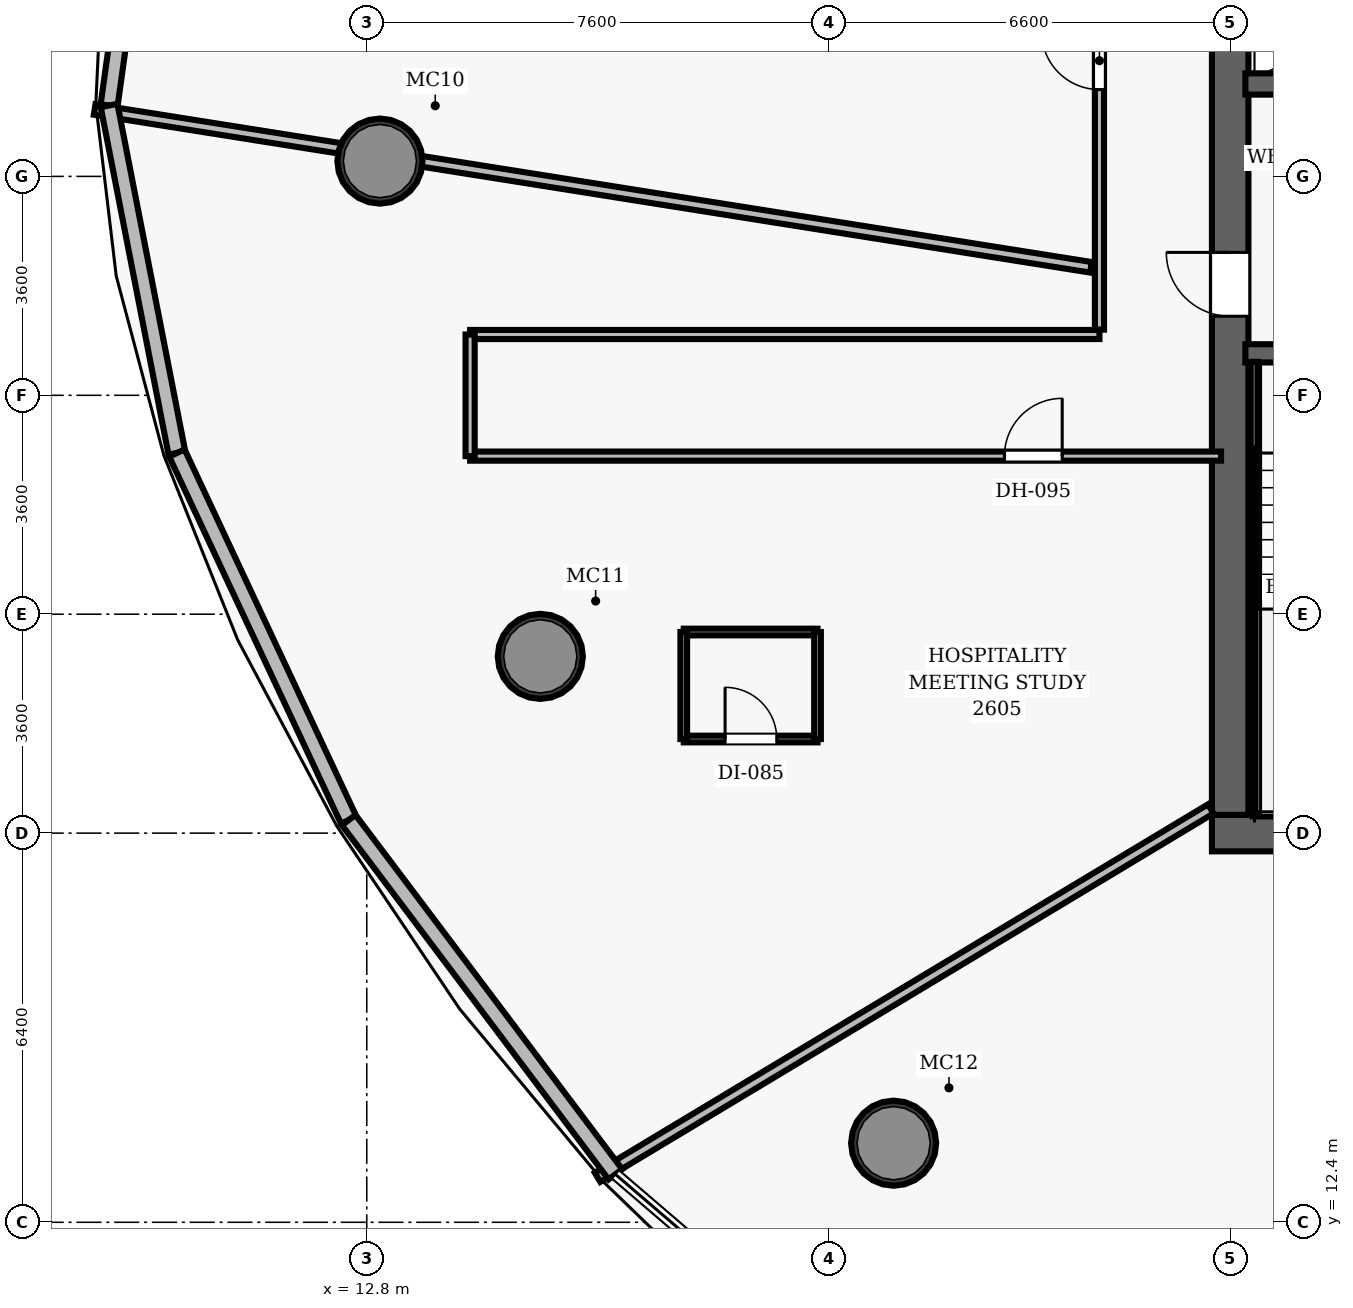
"""IFC4 building model, lengths in metres.
Left out: names, types, materials, properties, quantities, classifications, styles, units other than length and angle.
Written with IfcOpenShell. Run it as: python <this file> out.ifc"""

import sys

from ifc_helpers import new_model, si_unit, direction, frame, frame_2d, origin, origin_2d, place, context, subcontext, project, spatial, rectangle, hollow_circle, extrude, element, fill, save


model = new_model("IFC4")
c1 = context("Model", 3, precision=1e-05, world=origin(), true_north=direction((0.0, 1.0)))
c2 = subcontext(c1, "Body", "Model", "MODEL_VIEW")
j1 = project(units=[si_unit("LENGTHUNIT", "METRE"), si_unit("PLANEANGLEUNIT", "RADIAN")], contexts=[c1])
p1 = place(None, origin())
s1 = spatial("IfcSite", under=j1, at=p1, CompositionType="ELEMENT")
p2 = place(p1, origin())
s2 = spatial("IfcBuilding", under=s1, at=p2, CompositionType="ELEMENT")
p3 = place(p2, frame((0.0, 0.0, 109.8)))
s3 = spatial("IfcBuildingStorey", under=s2, at=p3, CompositionType="ELEMENT", Elevation=109.8)
p4 = place(p3, frame((26.7, 18.8, 0.0), z_axis=(0.0, 0.0, 1.0), x_axis=(1.0, 0.0, 0.0)))
e1 = element("IfcWall", 1, at=p4, inside=s3, PredefinedType="SHEAR", context=c2, shape_type="SweptSolid", body=[
    extrude(rectangle(XDim=22.6, YDim=0.6, at=frame_2d((11.3, 0.0))), origin(), (0.0, 0.0, 1.0), 3.5),
])
p5 = place(p4, frame((14.52, 0.0, 0.0)))
e2 = element("IfcOpeningElement", 2, at=p5, cuts=e1, PredefinedType="OPENING", context=c2, shape_type="SweptSolid", body=[
    extrude(rectangle(XDim=1.05, YDim=2.15, at=frame_2d((0.525, 1.075))), frame((0.0, 0.31, 0.0), z_axis=(0.0, -1.0, 0.0), x_axis=(1.0, 0.0, 0.0)), (0.0, 0.0, 1.0), 0.62),
])
p6 = place(p3, frame((27.0, 19.1, 0.0), z_axis=(0.0, 0.0, 1.0), x_axis=(0.0, 1.0, 0.0)))
e3 = element("IfcWall", 3, at=p6, inside=s3, PredefinedType="SHEAR", context=c2, shape_type="SweptSolid", body=[
    extrude(rectangle(XDim=13.8, YDim=0.6, at=frame_2d((6.9, 0.0))), origin(), (0.0, 0.0, 1.0), 3.5),
])
p7 = place(p6, frame((8.2, 0.0, 0.0)))
e4 = element("IfcOpeningElement", 4, at=p7, cuts=e3, PredefinedType="OPENING", context=c2, shape_type="SweptSolid", body=[
    extrude(rectangle(XDim=1.05, YDim=2.15, at=frame_2d((0.525, 1.075))), frame((0.0, 0.31, 0.0), z_axis=(0.0, -1.0, 0.0), x_axis=(1.0, 0.0, 0.0)), (0.0, 0.0, 1.0), 0.62),
])
for number, where, z_axis, x_axis in (
    (5, (13.016, 29.852, 0.0), (0.0, 0.0, 1.0), (1.0, 0.0, 0.0)),
    (6, (15.654, 21.707, 0.0), (0.0, 0.0, 1.0), (1.0, 0.0, 0.0)),
    (7, (21.465, 13.701, 0.0), (0.0, 0.0, 1.0), (1.0, 0.0, 0.0)),
):
    element("IfcColumn", number, at=place(p3, frame(where, z_axis=z_axis, x_axis=x_axis)), inside=s3, PredefinedType="COLUMN", context=c2, shape_type="SweptSolid", body=[
        extrude(hollow_circle(Radius=0.7, WallThickness=0.055, at=origin_2d()), origin(), (0.0, 0.0, 1.0), 3.5),
    ])
p8 = place(p3, frame((27.25, 26.69, 0.0), z_axis=(0.0, 0.0, 1.0), x_axis=(1.0, 0.0, 0.0)))
e8 = element("IfcWall", 8, at=p8, inside=s3, PredefinedType="SHEAR", context=c2, shape_type="SweptSolid", body=[
    extrude(rectangle(XDim=3.67, YDim=0.3, at=frame_2d((1.835, 0.0))), origin(), (0.0, 0.0, 1.0), 3.5),
])
p9 = place(p8, frame((1.05, 0.0, 0.0)))
e9 = element("IfcOpeningElement", 9, at=p9, cuts=e8, PredefinedType="OPENING", context=c2, shape_type="SweptSolid", body=[
    extrude(rectangle(XDim=1.1, YDim=2.15, at=frame_2d((0.55, 1.075))), frame((0.0, 0.16, 0.0), z_axis=(0.0, -1.0, 0.0), x_axis=(1.0, 0.0, 0.0)), (0.0, 0.0, 1.0), 0.32),
])
p10 = place(p3, frame((27.395, 19.1, 0.0), z_axis=(0.0, 0.0, 1.0), x_axis=(0.0, 1.0, 0.0)))
e10 = element("IfcWall", 10, at=p10, inside=s3, PredefinedType="SHEAR", context=c2, shape_type="SweptSolid", body=[
    extrude(rectangle(XDim=7.45, YDim=0.12, at=frame_2d((3.725, 0.0))), origin(), (0.0, 0.0, 1.0), 3.5),
])
p11 = place(p3, frame((27.395, 19.16, 0.0), z_axis=(0.0, 0.0, 1.0), x_axis=(1.0, 0.0, 0.0)))
e11 = element("IfcWall", 11, at=p11, inside=s3, PredefinedType="SHEAR", context=c2, shape_type="SweptSolid", body=[
    extrude(rectangle(XDim=3.095, YDim=0.12, at=frame_2d((1.547, 0.0))), origin(), (0.0, 0.0, 1.0), 3.5),
])
p12 = place(p3, frame((27.25, 31.12, 0.0), z_axis=(0.0, 0.0, 1.0), x_axis=(1.0, 0.0, 0.0)))
e12 = element("IfcWall", 12, at=p12, inside=s3, PredefinedType="SHEAR", context=c2, shape_type="SweptSolid", body=[
    extrude(rectangle(XDim=3.67, YDim=0.35, at=frame_2d((1.835, 0.0))), origin(), (0.0, 0.0, 1.0), 2.675),
])
p13 = place(p12, frame((1.25, 0.0, 0.0)))
e13 = element("IfcOpeningElement", 13, at=p13, cuts=e12, PredefinedType="OPENING", context=c2, shape_type="SweptSolid", body=[
    extrude(rectangle(XDim=1.1, YDim=2.15, at=frame_2d((0.55, 1.075))), frame((0.0, 0.185, 0.0), z_axis=(0.0, -1.0, 0.0), x_axis=(1.0, 0.0, 0.0)), (0.0, 0.0, 1.0), 0.37),
])
p14 = place(p3, frame((24.85, 27.08, 0.0), z_axis=(0.0, 0.0, 1.0), x_axis=(0.0, 1.0, 0.0)))
e14 = element("IfcWall", 14, at=p14, inside=s3, PredefinedType="PARTITIONING", context=c2, shape_type="SweptSolid", body=[
    extrude(rectangle(XDim=8.12, YDim=0.15, at=frame_2d((4.06, 0.0))), origin(), (0.0, 0.0, 1.0), 2.675),
])
p15 = place(p14, frame((3.948, 0.0, 0.0)))
e15 = element("IfcOpeningElement", 15, at=p15, cuts=e14, PredefinedType="OPENING", context=c2, shape_type="SweptSolid", body=[
    extrude(rectangle(XDim=0.95, YDim=2.15, at=frame_2d((0.475, 1.075))), frame((0.0, 0.085, 0.0), z_axis=(0.0, -1.0, 0.0), x_axis=(1.0, 0.0, 0.0)), (0.0, 0.0, 1.0), 0.17),
])
p16 = place(p3, frame((14.5, 27.0, 0.0), z_axis=(0.0, 0.0, 1.0), x_axis=(1.0, 0.0, 0.0)))
e16 = element("IfcWall", 16, at=p16, inside=s3, PredefinedType="PARTITIONING", context=c2, shape_type="SweptSolid", body=[
    extrude(rectangle(XDim=10.35, YDim=0.15, at=frame_2d((5.175, 0.0))), origin(), (0.0, 0.0, 1.0), 2.675),
])
p17 = place(p3, frame((14.5, 25.0, 0.0), z_axis=(0.0, 0.0, 1.0), x_axis=(1.0, 0.0, 0.0)))
e17 = element("IfcWall", 17, at=p17, inside=s3, PredefinedType="PARTITIONING", context=c2, shape_type="SweptSolid", body=[
    extrude(rectangle(XDim=12.35, YDim=0.15, at=frame_2d((6.175, 0.0))), origin(), (0.0, 0.0, 1.0), 2.675),
])
p18 = place(p17, frame((8.788, 0.0, 0.0)))
e18 = element("IfcOpeningElement", 18, at=p18, cuts=e17, PredefinedType="OPENING", context=c2, shape_type="SweptSolid", body=[
    extrude(rectangle(XDim=0.95, YDim=2.15, at=frame_2d((0.475, 1.075))), frame((0.0, 0.085, 0.0), z_axis=(0.0, -1.0, 0.0), x_axis=(1.0, 0.0, 0.0)), (0.0, 0.0, 1.0), 0.17),
])
p19 = place(p3, frame((14.5, 25.0, 0.0), z_axis=(0.0, 0.0, 1.0), x_axis=(0.0, 1.0, 0.0)))
e19 = element("IfcWall", 19, at=p19, inside=s3, PredefinedType="PARTITIONING", context=c2, shape_type="SweptSolid", body=[
    extrude(rectangle(XDim=2.0, YDim=0.15, at=frame_2d((1.0, 0.0))), origin(), (0.0, 0.0, 1.0), 2.675),
])
p20 = place(p3, frame((24.71, 28.105, 0.0), z_axis=(0.0, 0.0, 1.0), x_axis=(-0.987688276275, 0.156434871144, 0.0)))
e20 = element("IfcWall", 20, at=p20, inside=s3, PredefinedType="PARTITIONING", context=c2, shape_type="SweptSolid", body=[
    extrude(rectangle(XDim=16.59, YDim=0.175, at=frame_2d((8.295, 0.0))), origin(), (0.0, 0.0, 1.0), 2.675),
])
p21 = place(p3, frame((26.68, 19.198, 0.0), z_axis=(0.0, 0.0, 1.0), x_axis=(-0.857163158483, -0.515044968657, 0.0)))
e21 = element("IfcWall", 21, at=p21, inside=s3, PredefinedType="PARTITIONING", context=c2, shape_type="SweptSolid", body=[
    extrude(rectangle(XDim=11.765, YDim=0.175, at=frame_2d((5.882, 0.0))), origin(), (0.0, 0.0, 1.0), 2.675),
])
p22 = place(p3, frame((18.013, 20.347, 0.0), z_axis=(0.0, 0.0, 1.0), x_axis=(1.0, 0.0, 0.0)))
e22 = element("IfcWall", 22, at=p22, inside=s3, PredefinedType="PARTITIONING", context=c2, shape_type="SweptSolid", body=[
    extrude(rectangle(XDim=2.2, YDim=0.11, at=frame_2d((1.1, 0.0))), origin(), (0.0, 0.0, 1.0), 2.675),
])
p23 = place(p22, frame((0.68, 0.0, 0.0)))
e23 = element("IfcOpeningElement", 23, at=p23, cuts=e22, PredefinedType="OPENING", context=c2, shape_type="SweptSolid", body=[
    extrude(rectangle(XDim=0.85, YDim=2.1, at=frame_2d((0.425, 1.05))), frame((0.0, 0.065, 0.0), z_axis=(0.0, -1.0, 0.0), x_axis=(1.0, 0.0, 0.0)), (0.0, 0.0, 1.0), 0.13),
])
p24 = place(p3, frame((18.013, 22.107, 0.0), z_axis=(0.0, 0.0, 1.0), x_axis=(1.0, 0.0, 0.0)))
e24 = element("IfcWall", 24, at=p24, inside=s3, PredefinedType="PARTITIONING", context=c2, shape_type="SweptSolid", body=[
    extrude(rectangle(XDim=2.2, YDim=0.11, at=frame_2d((1.1, 0.0))), origin(), (0.0, 0.0, 1.0), 2.675),
])
for number, where, z_axis, x_axis in (
    (25, (18.013, 20.347, 0.0), (0.0, 0.0, 1.0), (0.0, 1.0, 0.0)),
    (26, (20.213, 20.347, 0.0), (0.0, 0.0, 1.0), (0.0, 1.0, 0.0)),
):
    element("IfcWall", number, at=place(p3, frame(where, z_axis=z_axis, x_axis=x_axis)), inside=s3, PredefinedType="PARTITIONING", context=c2, shape_type="SweptSolid", body=[
        extrude(rectangle(XDim=1.76, YDim=0.11, at=frame_2d((0.88, 0.0))), origin(), (0.0, 0.0, 1.0), 2.675),
    ])
p25 = place(p3, frame((8.562, 30.766, 0.0), z_axis=(0.0, 0.0, 1.0), x_axis=(0.137820388365, 0.990457238123, 0.0)))
e27 = element("IfcWall", 27, at=p25, inside=s3, PredefinedType="SOLIDWALL", context=c2, shape_type="SweptSolid", body=[
    extrude(rectangle(XDim=5.174, YDim=0.28, at=frame_2d((2.587, 0.0))), origin(), (0.0, 0.0, 1.0), 3.26),
])
p26 = place(p3, frame((9.677, 25.051, 0.0), z_axis=(0.0, 0.0, 1.0), x_axis=(-0.191526121359, 0.981487516394, 0.0)))
e28 = element("IfcWall", 28, at=p26, inside=s3, PredefinedType="SOLIDWALL", context=c2, shape_type="SweptSolid", body=[
    extrude(rectangle(XDim=5.823, YDim=0.28, at=frame_2d((2.912, 0.0))), origin(), (0.0, 0.0, 1.0), 3.26),
])
p27 = place(p3, frame((12.503, 19.014, 0.0), z_axis=(0.0, 0.0, 1.0), x_axis=(-0.424018095965, 0.905653716546, 0.0)))
e29 = element("IfcWall", 29, at=p27, inside=s3, PredefinedType="SOLIDWALL", context=c2, shape_type="SweptSolid", body=[
    extrude(rectangle(XDim=6.665, YDim=0.28, at=frame_2d((3.333, 0.0))), origin(), (0.0, 0.0, 1.0), 3.26),
])
p28 = place(p3, frame((16.889, 13.189, 0.0), z_axis=(0.0, 0.0, 1.0), x_axis=(-0.601456187388, 0.798905785842, 0.0)))
e30 = element("IfcWall", 30, at=p28, inside=s3, PredefinedType="SOLIDWALL", context=c2, shape_type="SweptSolid", body=[
    extrude(rectangle(XDim=7.292, YDim=0.28, at=frame_2d((3.646, 0.0))), origin(), (0.0, 0.0, 1.0), 3.26),
])
p29 = place(p7, origin())
e31 = element("IfcDoor", 31, at=p29, inside=s3, OperationType="SINGLE_SWING_RIGHT", PredefinedType="DOOR", context=c2, shape_type="SweptSolid", body=[
    extrude(rectangle(XDim=1.05, YDim=2.15, at=frame_2d((0.525, 1.075))), frame((0.0, 0.025, 0.0), z_axis=(0.0, -1.0, 0.0), x_axis=(1.0, 0.0, 0.0)), (0.0, 0.0, 1.0), 0.05),
])
fill(e4, e31)
p30 = place(p15, origin())
e32 = element("IfcDoor", 32, at=p30, inside=s3, OperationType="SINGLE_SWING_RIGHT", PredefinedType="DOOR", context=c2, shape_type="SweptSolid", body=[
    extrude(rectangle(XDim=0.95, YDim=2.15, at=frame_2d((0.475, 1.075))), frame((0.0, 0.025, 0.0), z_axis=(0.0, -1.0, 0.0), x_axis=(1.0, 0.0, 0.0)), (0.0, 0.0, 1.0), 0.05),
])
fill(e15, e32)
p31 = place(p18, origin())
e33 = element("IfcDoor", 33, at=p31, inside=s3, OperationType="SINGLE_SWING_RIGHT", PredefinedType="DOOR", context=c2, shape_type="SweptSolid", body=[
    extrude(rectangle(XDim=0.95, YDim=2.15, at=frame_2d((0.475, 1.075))), frame((0.0, 0.025, 0.0), z_axis=(0.0, -1.0, 0.0), x_axis=(1.0, 0.0, 0.0)), (0.0, 0.0, 1.0), 0.05),
])
fill(e18, e33)
p32 = place(p23, origin())
e34 = element("IfcDoor", 34, at=p32, inside=s3, OperationType="SINGLE_SWING_LEFT", PredefinedType="DOOR", context=c2, shape_type="SweptSolid", body=[
    extrude(rectangle(XDim=0.85, YDim=2.1, at=frame_2d((0.425, 1.05))), frame((0.0, 0.025, 0.0), z_axis=(0.0, -1.0, 0.0), x_axis=(1.0, 0.0, 0.0)), (0.0, 0.0, 1.0), 0.05),
])
fill(e23, e34)
save(model, sys.argv[1])
